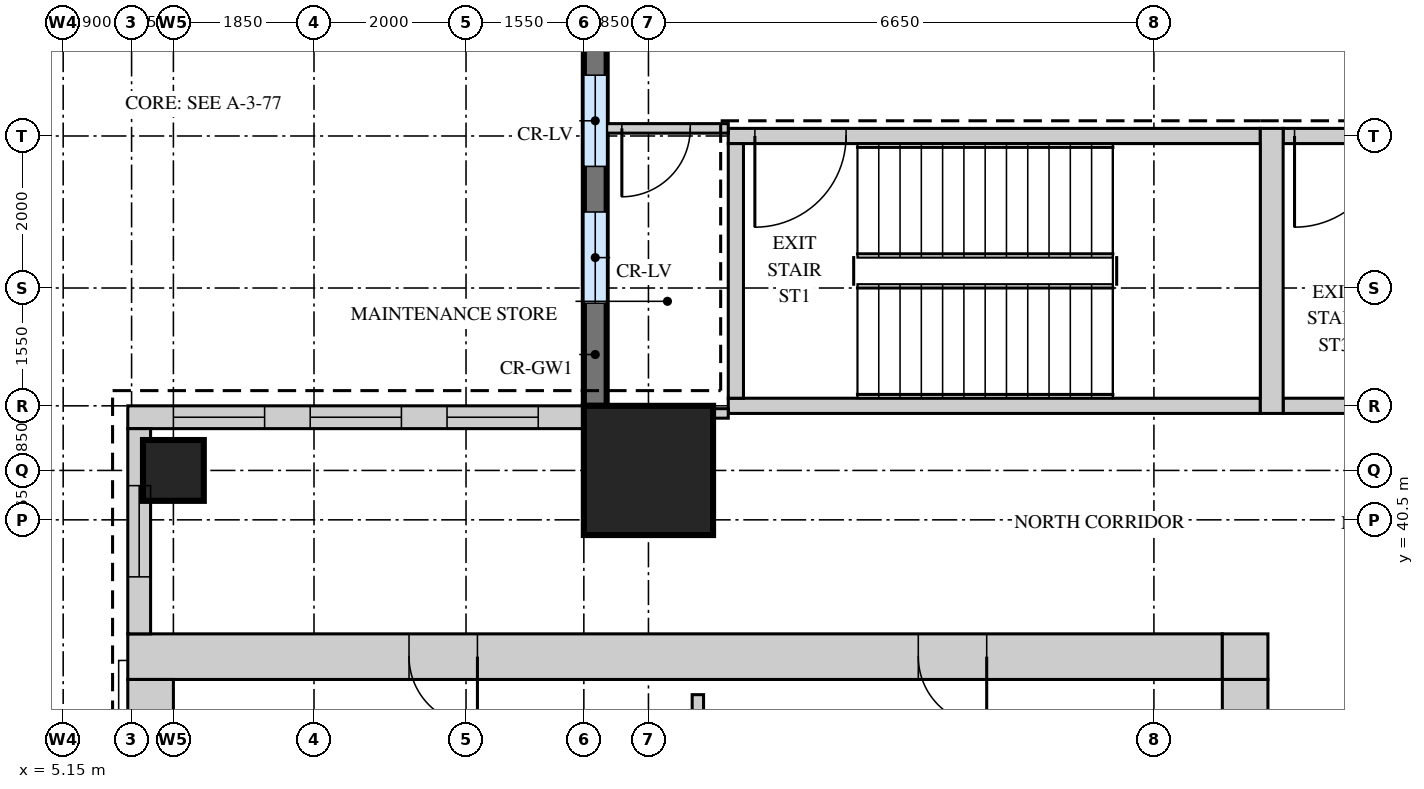
"""IFC4 building model, lengths in metres.
Left out: names, types, materials, properties, quantities, classifications, styles, units other than length and angle.
Written with IfcOpenShell. Run it as: python <this file> out.ifc"""

import sys

from ifc_helpers import new_model, si_unit, direction, frame, frame_2d, origin, origin_2d, place, context, subcontext, project, spatial, rectangle, extrude, source, transform, mapped, element, fill, save


model = new_model("IFC4")
c1 = context("Model", 3, precision=1e-05, world=origin(), true_north=direction((0.0, 1.0)))
c2 = subcontext(c1, "Body", "Model", "MODEL_VIEW")
j1 = project(units=[si_unit("LENGTHUNIT", "METRE"), si_unit("PLANEANGLEUNIT", "RADIAN")], contexts=[c1])
p1 = place(None, origin())
s1 = spatial("IfcSite", under=j1, at=p1, CompositionType="ELEMENT")
p2 = place(p1, origin())
s2 = spatial("IfcBuilding", under=s1, at=p2, CompositionType="ELEMENT")
p3 = place(p2, frame((0.0, 0.0, 334.7)))
s3 = spatial("IfcBuildingStorey", under=s2, at=p3, CompositionType="ELEMENT", Elevation=334.7)
m1 = source(origin(), c2, "Body", "SweptSolid", [
    extrude(rectangle(XDim=14.4, YDim=0.6, at=frame_2d((7.2, 0.0))), origin(), (0.0, 0.0, 1.0), 4.25),
])
p4 = place(p3, frame((6.0, 38.7, 0.0), z_axis=(0.0, 0.0, 1.0), x_axis=(1.0, 0.0, 0.0)))
e1 = element("IfcWall", 1, at=p4, inside=s3, PredefinedType="SHEAR", context=c2, shape_type="MappedRepresentation", body=[
    mapped(m1, transform((0.0, 0.0, 0.0))),
])
m2 = source(origin(), c2, "Body", "SweptSolid", [
    extrude(rectangle(XDim=0.9, YDim=2.1, at=frame_2d((0.45, 1.05))), frame((0.0, 0.31, 0.0), z_axis=(0.0, -1.0, 0.0), x_axis=(1.0, 0.0, 0.0)), (0.0, 0.0, 1.0), 0.62),
])
p5 = place(p4, frame((3.7, 0.0, 0.0)))
e2 = element("IfcOpeningElement", 2, at=p5, cuts=e1, PredefinedType="OPENING", context=c2, shape_type="MappedRepresentation", body=[
    mapped(m2, transform((0.0, 0.0, 0.0))),
])
p6 = place(p4, frame((10.4, 0.0, 0.0)))
e3 = element("IfcOpeningElement", 3, at=p6, cuts=e1, PredefinedType="OPENING", context=c2, shape_type="MappedRepresentation", body=[
    mapped(m2, transform((0.0, 0.0, 0.0))),
])
m3 = source(origin(), c2, "Body", "SweptSolid", [
    extrude(rectangle(XDim=0.6, YDim=0.6, at=frame_2d((0.3, 0.0))), origin(), (0.0, 0.0, 1.0), 4.25),
])
p7 = place(p3, frame((20.4, 38.7, 0.0), z_axis=(0.0, 0.0, 1.0), x_axis=(1.0, 0.0, 0.0)))
e4 = element("IfcWall", 4, at=p7, inside=s3, PredefinedType="SHEAR", context=c2, shape_type="MappedRepresentation", body=[
    mapped(m3, transform((0.0, 0.0, 0.0))),
])
m4 = source(origin(), c2, "Body", "SweptSolid", [
    extrude(rectangle(XDim=22.8, YDim=0.6, at=frame_2d((11.4, 0.0))), origin(), (0.0, 0.0, 1.0), 4.25),
])
p8 = place(p3, frame((20.7, 15.6, 0.0), z_axis=(0.0, 0.0, 1.0), x_axis=(0.0, 1.0, 0.0)))
e5 = element("IfcWall", 5, at=p8, inside=s3, PredefinedType="SHEAR", context=c2, shape_type="MappedRepresentation", body=[
    mapped(m4, transform((0.0, 0.0, 0.0))),
])
p9 = place(p8, frame((8.2, 0.0, 0.0)))
e6 = element("IfcOpeningElement", 6, at=p9, cuts=e5, PredefinedType="OPENING", context=c2, shape_type="MappedRepresentation", body=[
    mapped(m2, transform((0.0, 0.0, 0.0))),
])
p10 = place(p8, frame((11.35, 0.0, 0.0)))
e7 = element("IfcOpeningElement", 7, at=p10, cuts=e5, PredefinedType="OPENING", context=c2, shape_type="MappedRepresentation", body=[
    mapped(m2, transform((0.0, 0.0, 0.0))),
])
p11 = place(p8, frame((14.65, 0.0, 0.0)))
e8 = element("IfcOpeningElement", 8, at=p11, cuts=e5, PredefinedType="OPENING", context=c2, shape_type="MappedRepresentation", body=[
    mapped(m2, transform((0.0, 0.0, 0.0))),
])
p12 = place(p8, frame((1.55, 0.0, 0.0)))
e9 = element("IfcOpeningElement", 9, at=p12, cuts=e5, PredefinedType="OPENING", context=c2, shape_type="MappedRepresentation", body=[
    mapped(m2, transform((0.0, 0.0, 0.0))),
])
p13 = place(p8, frame((5.1, 0.0, 0.0)))
e10 = element("IfcOpeningElement", 10, at=p13, cuts=e5, PredefinedType="OPENING", context=c2, shape_type="MappedRepresentation", body=[
    mapped(m2, transform((0.0, 0.0, 0.0))),
])
p14 = place(p3, frame((6.3, 15.6, 0.0), z_axis=(0.0, 0.0, 1.0), x_axis=(0.0, 1.0, 0.0)))
e11 = element("IfcWall", 11, at=p14, inside=s3, PredefinedType="SHEAR", context=c2, shape_type="MappedRepresentation", body=[
    mapped(m4, transform((0.0, 0.0, 0.0))),
])
m5 = source(origin(), c2, "Body", "SweptSolid", [
    extrude(rectangle(XDim=7.0, YDim=0.2, at=frame_2d((3.5, 0.0))), origin(), (0.0, 0.0, 1.0), 4.25),
])
p15 = place(p3, frame((13.9, 45.55, 0.0), z_axis=(0.0, 0.0, 1.0), x_axis=(1.0, 0.0, 0.0)))
e12 = element("IfcWall", 12, at=p15, inside=s3, PredefinedType="SHEAR", context=c2, shape_type="MappedRepresentation", body=[
    mapped(m5, transform((0.0, 0.0, 0.0))),
])
m6 = source(origin(), c2, "Body", "SweptSolid", [
    extrude(rectangle(XDim=1.2, YDim=2.1, at=frame_2d((0.6, 1.05))), frame((0.0, 0.11, 0.0), z_axis=(0.0, -1.0, 0.0), x_axis=(1.0, 0.0, 0.0)), (0.0, 0.0, 1.0), 0.22),
])
p16 = place(p15, frame((0.35, 0.0, 0.0)))
e13 = element("IfcOpeningElement", 13, at=p16, cuts=e12, PredefinedType="OPENING", context=c2, shape_type="MappedRepresentation", body=[
    mapped(m6, transform((0.0, 0.0, 0.0))),
])
p17 = place(p3, frame((13.9, 42.0, 0.0), z_axis=(0.0, 0.0, 1.0), x_axis=(1.0, 0.0, 0.0)))
e14 = element("IfcWall", 14, at=p17, inside=s3, PredefinedType="SHEAR", context=c2, shape_type="MappedRepresentation", body=[
    mapped(m5, transform((0.0, 0.0, 0.0))),
])
m7 = source(origin(), c2, "Body", "SweptSolid", [
    extrude(rectangle(XDim=7.1, YDim=0.2, at=frame_2d((3.55, 0.0))), origin(), (0.0, 0.0, 1.0), 4.25),
])
p18 = place(p3, frame((21.2, 45.55, 0.0), z_axis=(0.0, 0.0, 1.0), x_axis=(1.0, 0.0, 0.0)))
e15 = element("IfcWall", 15, at=p18, inside=s3, PredefinedType="SHEAR", context=c2, shape_type="MappedRepresentation", body=[
    mapped(m7, transform((0.0, 0.0, 0.0))),
])
p19 = place(p18, frame((0.15, 0.0, 0.0)))
e16 = element("IfcOpeningElement", 16, at=p19, cuts=e15, PredefinedType="OPENING", context=c2, shape_type="MappedRepresentation", body=[
    mapped(m6, transform((0.0, 0.0, 0.0))),
])
p20 = place(p3, frame((21.2, 42.0, 0.0), z_axis=(0.0, 0.0, 1.0), x_axis=(1.0, 0.0, 0.0)))
e17 = element("IfcWall", 17, at=p20, inside=s3, PredefinedType="SHEAR", context=c2, shape_type="MappedRepresentation", body=[
    mapped(m7, transform((0.0, 0.0, 0.0))),
])
m8 = source(origin(), c2, "Body", "SweptSolid", [
    extrude(rectangle(XDim=3.75, YDim=0.3, at=frame_2d((1.875, 0.0))), origin(), (0.0, 0.0, 1.0), 4.25),
])
p21 = place(p3, frame((21.05, 41.9, 0.0), z_axis=(0.0, 0.0, 1.0), x_axis=(0.0, 1.0, 0.0)))
e18 = element("IfcWall", 18, at=p21, inside=s3, PredefinedType="SHEAR", context=c2, shape_type="MappedRepresentation", body=[
    mapped(m8, transform((0.0, 0.0, 0.0))),
])
m9 = source(origin(), c2, "Body", "SweptSolid", [
    extrude(rectangle(XDim=3.35, YDim=0.2, at=frame_2d((1.675, 0.0))), origin(), (0.0, 0.0, 1.0), 4.25),
])
p22 = place(p3, frame((14.0, 42.1, 0.0), z_axis=(0.0, 0.0, 1.0), x_axis=(0.0, 1.0, 0.0)))
e19 = element("IfcWall", 19, at=p22, inside=s3, PredefinedType="SHEAR", context=c2, shape_type="MappedRepresentation", body=[
    mapped(m9, transform((0.0, 0.0, 0.0))),
])
m10 = source(origin(), c2, "Body", "SweptSolid", [
    extrude(rectangle(XDim=1.7, YDim=1.7, at=origin_2d()), origin(), (0.0, 0.0, 1.0), 4.5),
])
p23 = place(p3, frame((12.85, 41.15, 0.0), z_axis=(0.0, 0.0, 1.0), x_axis=(1.0, 0.0, 0.0)))
e20 = element("IfcColumn", 20, at=p23, inside=s3, PredefinedType="COLUMN", context=c2, shape_type="MappedRepresentation", body=[
    mapped(m10, transform((0.0, 0.0, 0.0))),
])
m11 = source(origin(), c2, "Body", "SweptSolid", [
    extrude(rectangle(XDim=0.8, YDim=0.8, at=origin_2d()), origin(), (0.0, 0.0, 1.0), 4.5),
])
p24 = place(p3, frame((6.6, 41.15, 0.0), z_axis=(0.0, 0.0, 1.0), x_axis=(1.0, 0.0, 0.0)))
e21 = element("IfcColumn", 21, at=p24, inside=s3, PredefinedType="COLUMN", context=c2, shape_type="MappedRepresentation", body=[
    mapped(m11, transform((0.0, 0.0, 0.0))),
])
m12 = source(origin(), c2, "Body", "SweptSolid", [
    extrude(rectangle(XDim=5.7, YDim=0.3, at=frame_2d((2.85, 0.0))), origin(), (0.0, 0.0, 1.0), 4.5),
])
p25 = place(p3, frame((12.15, 47.7, 0.0), z_axis=(0.0, 0.0, 1.0), x_axis=(0.0, -1.0, 0.0)))
e22 = element("IfcWall", 22, at=p25, inside=s3, PredefinedType="SOLIDWALL", context=c2, shape_type="MappedRepresentation", body=[
    mapped(m12, transform((0.0, 0.0, 0.0))),
])
m13 = source(origin(), c2, "Body", "SweptSolid", [
    extrude(rectangle(XDim=1.2, YDim=2.4, at=frame_2d((0.6, 1.2))), frame((0.0, 0.16, 0.0), z_axis=(0.0, -1.0, 0.0), x_axis=(1.0, 0.0, 0.0)), (0.0, 0.0, 1.0), 0.32),
])
p26 = place(p25, frame((1.35, 0.0, 0.9)))
e23 = element("IfcOpeningElement", 23, at=p26, cuts=e22, PredefinedType="OPENING", context=c2, shape_type="MappedRepresentation", body=[
    mapped(m13, transform((0.0, 0.0, 0.0))),
])
p27 = place(p25, frame((3.15, 0.0, 0.9)))
e24 = element("IfcOpeningElement", 24, at=p27, cuts=e22, PredefinedType="OPENING", context=c2, shape_type="MappedRepresentation", body=[
    mapped(m13, transform((0.0, 0.0, 0.0))),
])
m14 = source(origin(), c2, "Body", "SweptSolid", [
    extrude(rectangle(XDim=6.0, YDim=0.3, at=frame_2d((3.0, 0.0))), origin(), (0.0, 0.0, 1.0), 4.5),
])
p28 = place(p3, frame((12.0, 41.85, 0.0), z_axis=(0.0, 0.0, 1.0), x_axis=(-1.0, 0.0, 0.0)))
e25 = element("IfcWall", 25, at=p28, inside=s3, PredefinedType="SOLIDWALL", context=c2, shape_type="MappedRepresentation", body=[
    mapped(m14, transform((0.0, 0.0, 0.0))),
])
p29 = place(p28, frame((0.6, 0.0, 0.9)))
e26 = element("IfcOpeningElement", 26, at=p29, cuts=e25, PredefinedType="OPENING", context=c2, shape_type="MappedRepresentation", body=[
    mapped(m13, transform((0.0, 0.0, 0.0))),
])
p30 = place(p28, frame((2.4, 0.0, 0.9)))
e27 = element("IfcOpeningElement", 27, at=p30, cuts=e25, PredefinedType="OPENING", context=c2, shape_type="MappedRepresentation", body=[
    mapped(m13, transform((0.0, 0.0, 0.0))),
])
p31 = place(p28, frame((4.2, 0.0, 0.9)))
e28 = element("IfcOpeningElement", 28, at=p31, cuts=e25, PredefinedType="OPENING", context=c2, shape_type="MappedRepresentation", body=[
    mapped(m13, transform((0.0, 0.0, 0.0))),
])
m15 = source(origin(), c2, "Body", "SweptSolid", [
    extrude(rectangle(XDim=2.7, YDim=0.3, at=frame_2d((1.35, 0.0))), origin(), (0.0, 0.0, 1.0), 4.5),
])
p32 = place(p3, frame((6.15, 41.7, 0.0), z_axis=(0.0, 0.0, 1.0), x_axis=(0.0, -1.0, 0.0)))
e29 = element("IfcWall", 29, at=p32, inside=s3, PredefinedType="SOLIDWALL", context=c2, shape_type="MappedRepresentation", body=[
    mapped(m15, transform((0.0, 0.0, 0.0))),
])
p33 = place(p32, frame((0.75, 0.0, 0.9)))
e30 = element("IfcOpeningElement", 30, at=p33, cuts=e29, PredefinedType="OPENING", context=c2, shape_type="MappedRepresentation", body=[
    mapped(m13, transform((0.0, 0.0, 0.0))),
])
m16 = source(origin(), c2, "Body", "SweptSolid", [
    extrude(rectangle(XDim=5.9, YDim=0.15, at=frame_2d((2.95, 0.0))), origin(), (0.0, 0.0, 1.0), 4.3),
])
p34 = place(p3, frame((13.5, 32.3, 0.0), z_axis=(0.0, 0.0, 1.0), x_axis=(0.0, 1.0, 0.0)))
e31 = element("IfcWall", 31, at=p34, inside=s3, PredefinedType="PARTITIONING", context=c2, shape_type="MappedRepresentation", body=[
    mapped(m16, transform((0.0, 0.0, 0.0))),
])
m17 = source(origin(), c2, "Body", "SweptSolid", [
    extrude(rectangle(XDim=1.9, YDim=0.125, at=frame_2d((0.95, 0.0))), origin(), (0.0, 0.0, 1.0), 4.3),
])
p35 = place(p3, frame((12.0, 41.9, 0.0), z_axis=(0.0, 0.0, 1.0), x_axis=(1.0, 0.0, 0.0)))
e32 = element("IfcWall", 32, at=p35, inside=s3, PredefinedType="PARTITIONING", context=c2, shape_type="MappedRepresentation", body=[
    mapped(m17, transform((0.0, 0.0, 0.0))),
])
m18 = source(origin(), c2, "Body", "SweptSolid", [
    extrude(rectangle(XDim=1.6, YDim=0.125, at=frame_2d((0.8, 0.0))), origin(), (0.0, 0.0, 1.0), 4.3),
])
p36 = place(p3, frame((12.3, 45.65, 0.0), z_axis=(0.0, 0.0, 1.0), x_axis=(1.0, 0.0, 0.0)))
e33 = element("IfcWall", 33, at=p36, inside=s3, PredefinedType="PARTITIONING", context=c2, shape_type="MappedRepresentation", body=[
    mapped(m18, transform((0.0, 0.0, 0.0))),
])
m19 = source(origin(), c2, "Body", "SweptSolid", [
    extrude(rectangle(XDim=0.9, YDim=2.1, at=frame_2d((0.45, 1.05))), frame((0.0, 0.073, 0.0), z_axis=(0.0, -1.0, 0.0), x_axis=(1.0, 0.0, 0.0)), (0.0, 0.0, 1.0), 0.145),
])
p37 = place(p36, frame((0.2, 0.0, 0.0)))
e34 = element("IfcOpeningElement", 34, at=p37, cuts=e33, PredefinedType="OPENING", context=c2, shape_type="MappedRepresentation", body=[
    mapped(m19, transform((0.0, 0.0, 0.0))),
])
m20 = source(origin(), c2, "Body", "SweptSolid", [
    extrude(rectangle(XDim=1.2, YDim=2.4, at=frame_2d((0.6, 1.2))), frame((0.0, 0.03, 0.0), z_axis=(0.0, -1.0, 0.0), x_axis=(1.0, 0.0, 0.0)), (0.0, 0.0, 1.0), 0.06),
])
p38 = place(p26, origin())
e35 = element("IfcWindow", 35, at=p38, inside=s3, PartitioningType="SINGLE_PANEL", PredefinedType="WINDOW", context=c2, shape_type="MappedRepresentation", body=[
    mapped(m20, transform((0.0, 0.0, 0.0))),
])
fill(e23, e35)
p39 = place(p27, origin())
e36 = element("IfcWindow", 36, at=p39, inside=s3, PartitioningType="SINGLE_PANEL", PredefinedType="WINDOW", context=c2, shape_type="MappedRepresentation", body=[
    mapped(m20, transform((0.0, 0.0, 0.0))),
])
fill(e24, e36)
p40 = place(p29, origin())
e37 = element("IfcWindow", 37, at=p40, inside=s3, PartitioningType="SINGLE_PANEL", PredefinedType="WINDOW", context=c2, shape_type="MappedRepresentation", body=[
    mapped(m20, transform((0.0, 0.0, 0.0))),
])
fill(e26, e37)
p41 = place(p30, origin())
e38 = element("IfcWindow", 38, at=p41, inside=s3, PartitioningType="SINGLE_PANEL", PredefinedType="WINDOW", context=c2, shape_type="MappedRepresentation", body=[
    mapped(m20, transform((0.0, 0.0, 0.0))),
])
fill(e27, e38)
p42 = place(p31, origin())
e39 = element("IfcWindow", 39, at=p42, inside=s3, PartitioningType="SINGLE_PANEL", PredefinedType="WINDOW", context=c2, shape_type="MappedRepresentation", body=[
    mapped(m20, transform((0.0, 0.0, 0.0))),
])
fill(e28, e39)
p43 = place(p33, origin())
e40 = element("IfcWindow", 40, at=p43, inside=s3, PartitioningType="SINGLE_PANEL", PredefinedType="WINDOW", context=c2, shape_type="MappedRepresentation", body=[
    mapped(m20, transform((0.0, 0.0, 0.0))),
])
fill(e30, e40)
m21 = source(origin(), c2, "Body", "SweptSolid", [
    extrude(rectangle(XDim=0.9, YDim=2.1, at=frame_2d((0.45, 1.05))), frame((0.0, 0.025, 0.0), z_axis=(0.0, -1.0, 0.0), x_axis=(1.0, 0.0, 0.0)), (0.0, 0.0, 1.0), 0.05),
])
p44 = place(p37, origin())
e41 = element("IfcDoor", 41, at=p44, inside=s3, OperationType="SINGLE_SWING_LEFT", PredefinedType="DOOR", context=c2, shape_type="MappedRepresentation", body=[
    mapped(m21, transform((0.0, 0.0, 0.0))),
])
fill(e34, e41)
m22 = source(origin(), c2, "Body", "SweptSolid", [
    extrude(rectangle(XDim=0.9, YDim=2.1, at=frame_2d((0.45, 1.05))), frame((0.0, 0.25, 0.0), z_axis=(0.0, -1.0, 0.0), x_axis=(1.0, 0.0, 0.0)), (0.0, 0.0, 1.0), 0.5),
])
p45 = place(p5, origin())
e42 = element("IfcDoor", 42, at=p45, inside=s3, OperationType="SINGLE_SWING_RIGHT", PredefinedType="DOOR", context=c2, shape_type="MappedRepresentation", body=[
    mapped(m22, transform((0.0, 0.0, 0.0))),
])
fill(e2, e42)
p46 = place(p6, origin())
e43 = element("IfcDoor", 43, at=p46, inside=s3, OperationType="SINGLE_SWING_RIGHT", PredefinedType="DOOR", context=c2, shape_type="MappedRepresentation", body=[
    mapped(m22, transform((0.0, 0.0, 0.0))),
])
fill(e3, e43)
m23 = source(origin(), c2, "Body", "SweptSolid", [
    extrude(rectangle(XDim=1.2, YDim=2.1, at=frame_2d((0.6, 1.05))), frame((0.0, 0.025, 0.0), z_axis=(0.0, -1.0, 0.0), x_axis=(1.0, 0.0, 0.0)), (0.0, 0.0, 1.0), 0.05),
])
p47 = place(p16, origin())
e44 = element("IfcDoor", 44, at=p47, inside=s3, OperationType="SINGLE_SWING_LEFT", PredefinedType="DOOR", context=c2, shape_type="MappedRepresentation", body=[
    mapped(m23, transform((0.0, 0.0, 0.0))),
])
fill(e13, e44)
p48 = place(p19, origin())
e45 = element("IfcDoor", 45, at=p48, inside=s3, OperationType="SINGLE_SWING_LEFT", PredefinedType="DOOR", context=c2, shape_type="MappedRepresentation", body=[
    mapped(m23, transform((0.0, 0.0, 0.0))),
])
fill(e16, e45)
save(model, sys.argv[1])
